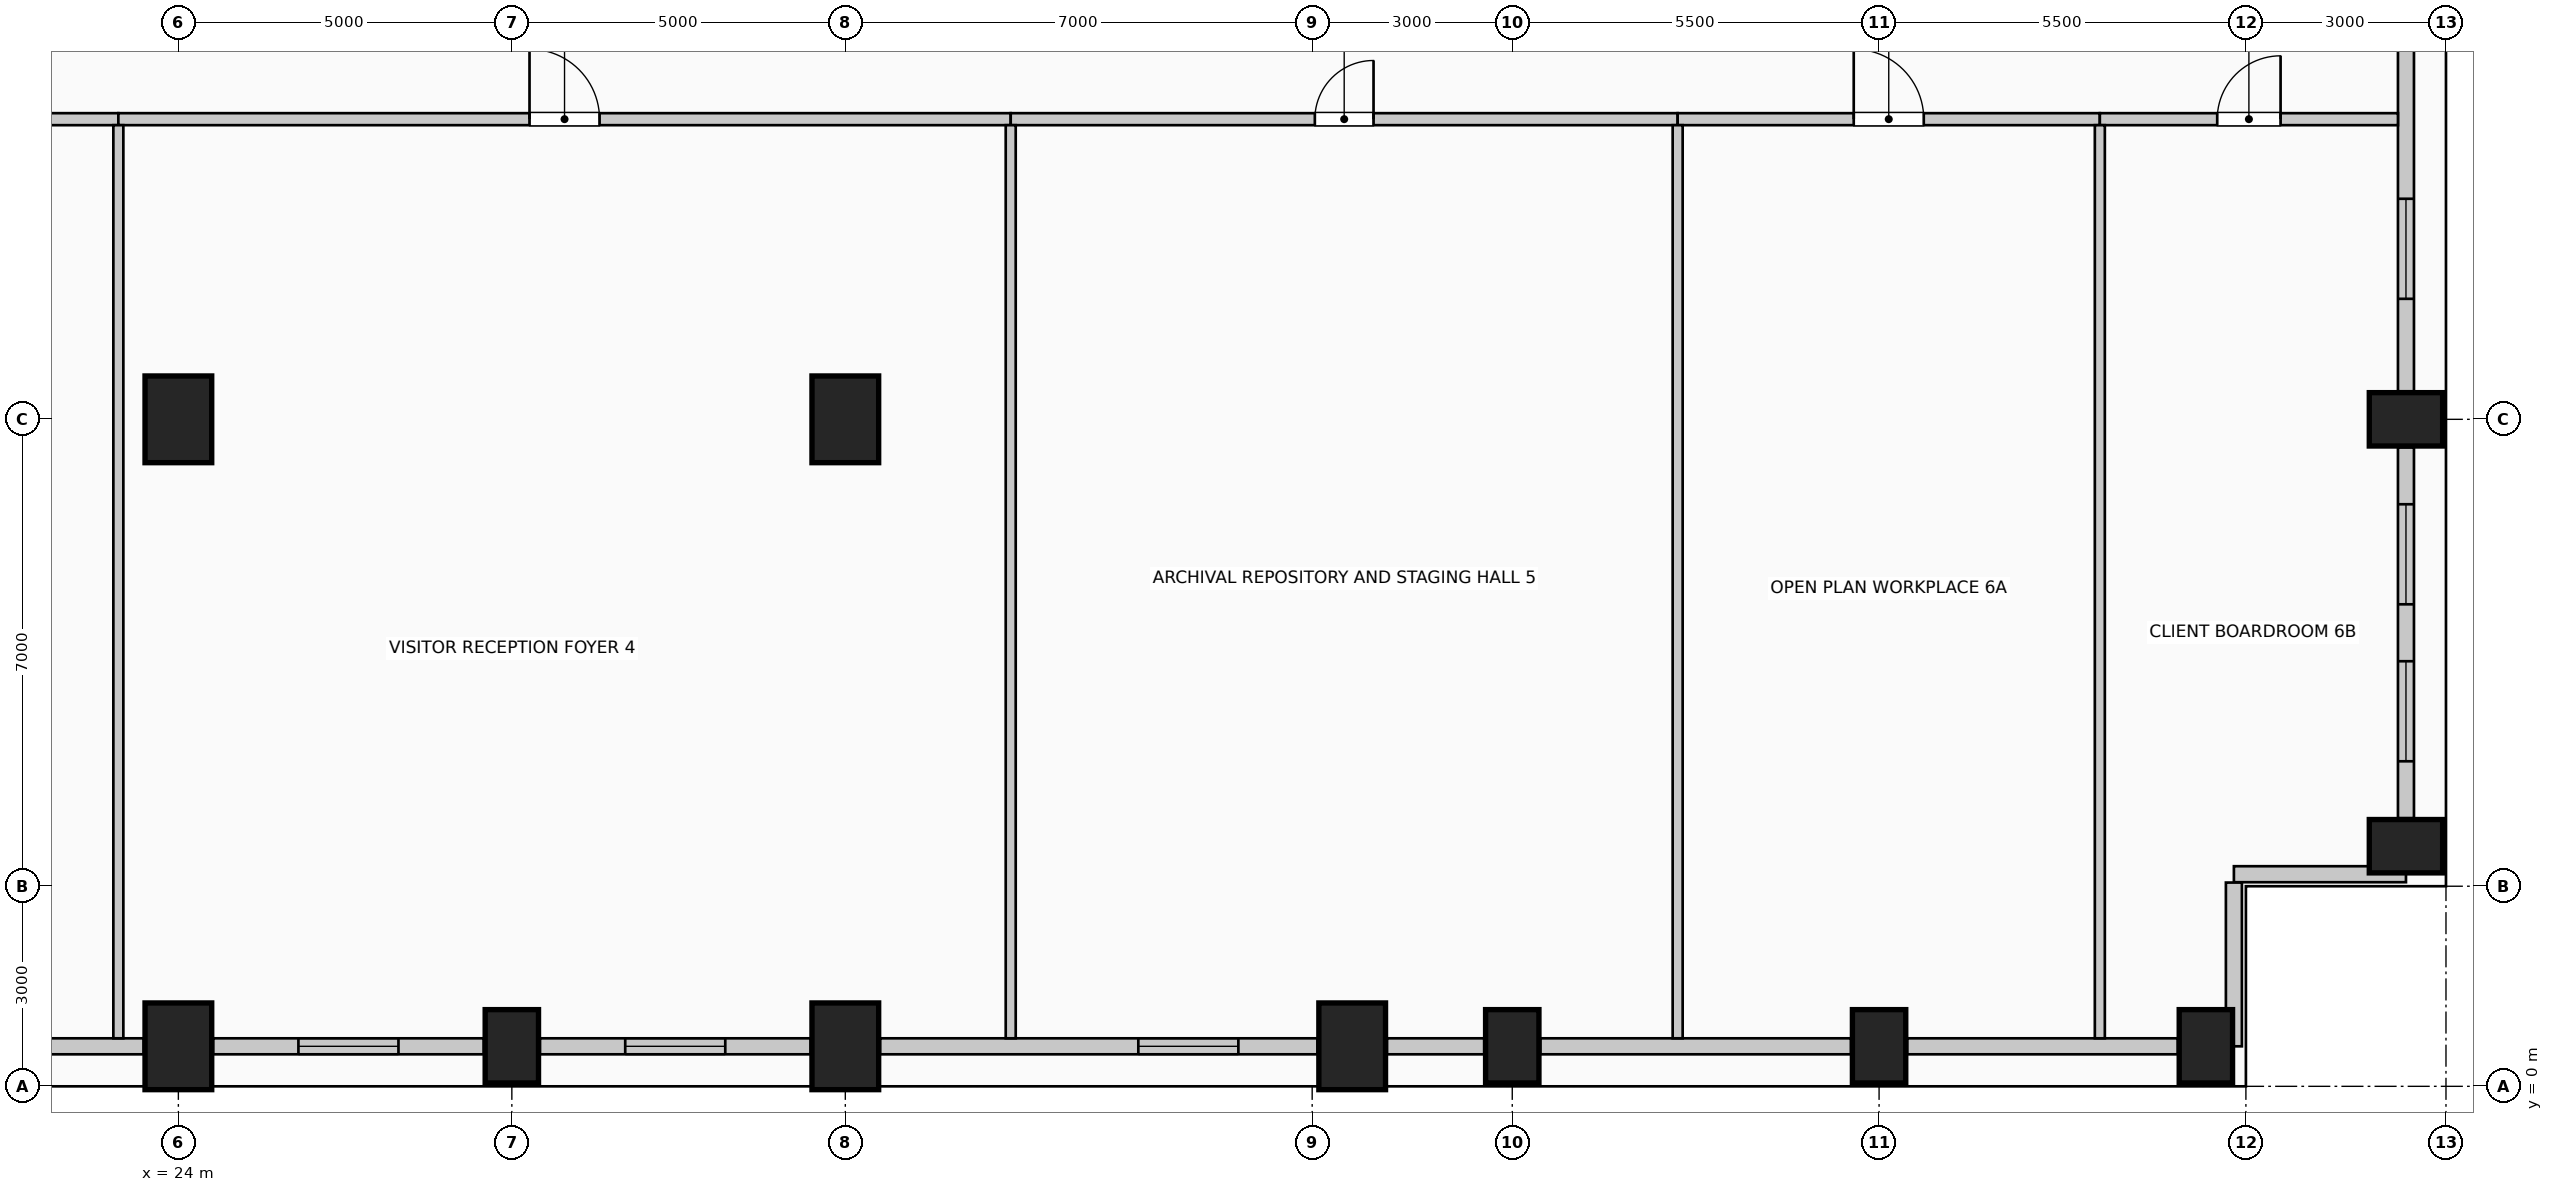
"""IFC4 building model, lengths in metres.
Left out: names, types, materials, properties, quantities, classifications, styles, units other than length and angle.
Written with IfcOpenShell. Run it as: python <this file> out.ifc"""

import sys

from ifc_helpers import new_model, si_unit, direction, frame, frame_2d, origin, origin_2d, place, context, subcontext, project, spatial, rectangle, extrude, element, fill, save


model = new_model("IFC4")
c1 = context("Model", 3, precision=1e-05, world=origin(), true_north=direction((0.0, 1.0)))
c2 = subcontext(c1, "Body", "Model", "MODEL_VIEW")
j1 = project(units=[si_unit("LENGTHUNIT", "METRE"), si_unit("PLANEANGLEUNIT", "RADIAN")], contexts=[c1])
p1 = place(None, origin())
s1 = spatial("IfcSite", under=j1, at=p1, CompositionType="ELEMENT")
p2 = place(p1, origin())
s2 = spatial("IfcBuilding", under=s1, at=p2, CompositionType="ELEMENT")
p3 = place(p2, frame((0.0, 0.0, 210.6)))
s3 = spatial("IfcBuildingStorey", under=s2, at=p3, CompositionType="ELEMENT", Elevation=210.6)
p4 = place(p3, frame((24.0, 0.6, 0.0), z_axis=(0.0, 0.0, 1.0), x_axis=(1.0, 0.0, 0.0)))
e1 = element("IfcColumn", 1, at=p4, inside=s3, PredefinedType="COLUMN", context=c2, shape_type="SweptSolid", body=[
    extrude(rectangle(XDim=1.0, YDim=1.3, at=origin_2d()), origin(), (0.0, 0.0, 1.0), 4.0),
])
p5 = place(p3, frame((29.0, 0.6, 0.0), z_axis=(0.0, 0.0, 1.0), x_axis=(1.0, 0.0, 0.0)))
e2 = element("IfcColumn", 2, at=p5, inside=s3, PredefinedType="COLUMN", context=c2, shape_type="SweptSolid", body=[
    extrude(rectangle(XDim=0.8, YDim=1.1, at=origin_2d()), origin(), (0.0, 0.0, 1.0), 4.0),
])
for number, where, z_axis, x_axis in (
    (3, (34.0, 0.6, 0.0), (0.0, 0.0, 1.0), (1.0, 0.0, 0.0)),
    (4, (41.6, 0.6, 0.0), (0.0, 0.0, 1.0), (1.0, 0.0, 0.0)),
):
    element("IfcColumn", number, at=place(p3, frame(where, z_axis=z_axis, x_axis=x_axis)), inside=s3, PredefinedType="COLUMN", context=c2, shape_type="SweptSolid", body=[
        extrude(rectangle(XDim=1.0, YDim=1.3, at=origin_2d()), origin(), (0.0, 0.0, 1.0), 4.0),
    ])
for number, where, z_axis, x_axis in (
    (5, (44.0, 0.6, 0.0), (0.0, 0.0, 1.0), (1.0, 0.0, 0.0)),
    (6, (49.5, 0.6, 0.0), (0.0, 0.0, 1.0), (1.0, 0.0, 0.0)),
    (7, (54.4, 0.6, 0.0), (0.0, 0.0, 1.0), (1.0, 0.0, 0.0)),
    (8, (57.4, 3.6, 0.0), (0.0, 0.0, 1.0), (0.0, 1.0, 0.0)),
    (9, (57.4, 10.0, 0.0), (0.0, 0.0, 1.0), (0.0, 1.0, 0.0)),
):
    element("IfcColumn", number, at=place(p3, frame(where, z_axis=z_axis, x_axis=x_axis)), inside=s3, PredefinedType="COLUMN", context=c2, shape_type="SweptSolid", body=[
        extrude(rectangle(XDim=0.8, YDim=1.1, at=origin_2d()), origin(), (0.0, 0.0, 1.0), 4.0),
    ])
for number, where, z_axis, x_axis in (
    (10, (24.0, 10.0, 0.0), (0.0, 0.0, 1.0), (1.0, 0.0, 0.0)),
    (11, (34.0, 10.0, 0.0), (0.0, 0.0, 1.0), (1.0, 0.0, 0.0)),
):
    element("IfcColumn", number, at=place(p3, frame(where, z_axis=z_axis, x_axis=x_axis)), inside=s3, PredefinedType="COLUMN", context=c2, shape_type="SweptSolid", body=[
        extrude(rectangle(XDim=1.0, YDim=1.3, at=origin_2d()), origin(), (0.0, 0.0, 1.0), 4.0),
    ])
p6 = place(p3, frame((23.48, 0.6, 0.0), z_axis=(0.0, 0.0, 1.0), x_axis=(-1.0, 0.0, 0.0)))
e12 = element("IfcWall", 12, at=p6, inside=s3, PredefinedType="SOLIDWALL", context=c2, shape_type="SweptSolid", body=[
    extrude(rectangle(XDim=6.56, YDim=0.24, at=frame_2d((3.28, 0.0))), origin(), (0.0, 0.0, 1.0), 3.0),
])
p7 = place(p6, frame((3.873, 0.0, 0.42)))
e13 = element("IfcOpeningElement", 13, at=p7, cuts=e12, PredefinedType="OPENING", context=c2, shape_type="SweptSolid", body=[
    extrude(rectangle(XDim=1.5, YDim=2.2, at=frame_2d((0.75, 1.1))), frame((0.0, 0.13, 0.0), z_axis=(0.0, -1.0, 0.0), x_axis=(1.0, 0.0, 0.0)), (0.0, 0.0, 1.0), 0.26),
])
p8 = place(p3, frame((28.58, 0.6, 0.0), z_axis=(0.0, 0.0, 1.0), x_axis=(-1.0, 0.0, 0.0)))
e14 = element("IfcWall", 14, at=p8, inside=s3, PredefinedType="SOLIDWALL", context=c2, shape_type="SweptSolid", body=[
    extrude(rectangle(XDim=4.06, YDim=0.24, at=frame_2d((2.03, 0.0))), origin(), (0.0, 0.0, 1.0), 3.0),
])
p9 = place(p8, frame((1.28, 0.0, 0.42)))
e15 = element("IfcOpeningElement", 15, at=p9, cuts=e14, PredefinedType="OPENING", context=c2, shape_type="SweptSolid", body=[
    extrude(rectangle(XDim=1.5, YDim=2.2, at=frame_2d((0.75, 1.1))), frame((0.0, 0.13, 0.0), z_axis=(0.0, -1.0, 0.0), x_axis=(1.0, 0.0, 0.0)), (0.0, 0.0, 1.0), 0.26),
])
p10 = place(p3, frame((33.48, 0.6, 0.0), z_axis=(0.0, 0.0, 1.0), x_axis=(-1.0, 0.0, 0.0)))
e16 = element("IfcWall", 16, at=p10, inside=s3, PredefinedType="SOLIDWALL", context=c2, shape_type="SweptSolid", body=[
    extrude(rectangle(XDim=4.06, YDim=0.24, at=frame_2d((2.03, 0.0))), origin(), (0.0, 0.0, 1.0), 3.0),
])
p11 = place(p10, frame((1.28, 0.0, 0.42)))
e17 = element("IfcOpeningElement", 17, at=p11, cuts=e16, PredefinedType="OPENING", context=c2, shape_type="SweptSolid", body=[
    extrude(rectangle(XDim=1.5, YDim=2.2, at=frame_2d((0.75, 1.1))), frame((0.0, 0.13, 0.0), z_axis=(0.0, -1.0, 0.0), x_axis=(1.0, 0.0, 0.0)), (0.0, 0.0, 1.0), 0.26),
])
p12 = place(p3, frame((41.08, 0.6, 0.0), z_axis=(0.0, 0.0, 1.0), x_axis=(-1.0, 0.0, 0.0)))
e18 = element("IfcWall", 18, at=p12, inside=s3, PredefinedType="SOLIDWALL", context=c2, shape_type="SweptSolid", body=[
    extrude(rectangle(XDim=6.56, YDim=0.24, at=frame_2d((3.28, 0.0))), origin(), (0.0, 0.0, 1.0), 3.0),
])
p13 = place(p12, frame((1.187, 0.0, 0.42)))
e19 = element("IfcOpeningElement", 19, at=p13, cuts=e18, PredefinedType="OPENING", context=c2, shape_type="SweptSolid", body=[
    extrude(rectangle(XDim=1.5, YDim=2.2, at=frame_2d((0.75, 1.1))), frame((0.0, 0.13, 0.0), z_axis=(0.0, -1.0, 0.0), x_axis=(1.0, 0.0, 0.0)), (0.0, 0.0, 1.0), 0.26),
])
p14 = place(p3, frame((43.58, 0.6, 0.0), z_axis=(0.0, 0.0, 1.0), x_axis=(-1.0, 0.0, 0.0)))
e20 = element("IfcWall", 20, at=p14, inside=s3, PredefinedType="SOLIDWALL", context=c2, shape_type="SweptSolid", body=[
    extrude(rectangle(XDim=1.46, YDim=0.24, at=frame_2d((0.73, 0.0))), origin(), (0.0, 0.0, 1.0), 3.0),
])
p15 = place(p3, frame((49.08, 0.6, 0.0), z_axis=(0.0, 0.0, 1.0), x_axis=(-1.0, 0.0, 0.0)))
e21 = element("IfcWall", 21, at=p15, inside=s3, PredefinedType="SOLIDWALL", context=c2, shape_type="SweptSolid", body=[
    extrude(rectangle(XDim=4.66, YDim=0.24, at=frame_2d((2.33, 0.0))), origin(), (0.0, 0.0, 1.0), 3.0),
])
p16 = place(p3, frame((53.98, 0.6, 0.0), z_axis=(0.0, 0.0, 1.0), x_axis=(-1.0, 0.0, 0.0)))
e22 = element("IfcWall", 22, at=p16, inside=s3, PredefinedType="SOLIDWALL", context=c2, shape_type="SweptSolid", body=[
    extrude(rectangle(XDim=4.06, YDim=0.24, at=frame_2d((2.03, 0.0))), origin(), (0.0, 0.0, 1.0), 3.0),
])
p17 = place(p3, frame((57.4, 9.58, 0.0), z_axis=(0.0, 0.0, 1.0), x_axis=(0.0, -1.0, 0.0)))
e23 = element("IfcWall", 23, at=p17, inside=s3, PredefinedType="SOLIDWALL", context=c2, shape_type="SweptSolid", body=[
    extrude(rectangle(XDim=5.56, YDim=0.24, at=frame_2d((2.78, 0.0))), origin(), (0.0, 0.0, 1.0), 3.0),
])
p18 = place(p17, frame((0.853, 0.0, 0.42)))
e24 = element("IfcOpeningElement", 24, at=p18, cuts=e23, PredefinedType="OPENING", context=c2, shape_type="SweptSolid", body=[
    extrude(rectangle(XDim=1.5, YDim=2.2, at=frame_2d((0.75, 1.1))), frame((0.0, 0.13, 0.0), z_axis=(0.0, -1.0, 0.0), x_axis=(1.0, 0.0, 0.0)), (0.0, 0.0, 1.0), 0.26),
])
p19 = place(p17, frame((3.207, 0.0, 0.42)))
e25 = element("IfcOpeningElement", 25, at=p19, cuts=e23, PredefinedType="OPENING", context=c2, shape_type="SweptSolid", body=[
    extrude(rectangle(XDim=1.5, YDim=2.2, at=frame_2d((0.75, 1.1))), frame((0.0, 0.13, 0.0), z_axis=(0.0, -1.0, 0.0), x_axis=(1.0, 0.0, 0.0)), (0.0, 0.0, 1.0), 0.26),
])
p20 = place(p3, frame((57.4, 17.58, 0.0), z_axis=(0.0, 0.0, 1.0), x_axis=(0.0, -1.0, 0.0)))
e26 = element("IfcWall", 26, at=p20, inside=s3, PredefinedType="SOLIDWALL", context=c2, shape_type="SweptSolid", body=[
    extrude(rectangle(XDim=7.16, YDim=0.24, at=frame_2d((3.58, 0.0))), origin(), (0.0, 0.0, 1.0), 3.0),
])
p21 = place(p20, frame((4.273, 0.0, 0.42)))
e27 = element("IfcOpeningElement", 27, at=p21, cuts=e26, PredefinedType="OPENING", context=c2, shape_type="SweptSolid", body=[
    extrude(rectangle(XDim=1.5, YDim=2.2, at=frame_2d((0.75, 1.1))), frame((0.0, 0.13, 0.0), z_axis=(0.0, -1.0, 0.0), x_axis=(1.0, 0.0, 0.0)), (0.0, 0.0, 1.0), 0.26),
])
p22 = place(p3, frame((57.4, 3.18, 0.0), z_axis=(0.0, 0.0, 1.0), x_axis=(-1.0, 0.0, 0.0)))
e28 = element("IfcWall", 28, at=p22, inside=s3, PredefinedType="SOLIDWALL", context=c2, shape_type="SweptSolid", body=[
    extrude(rectangle(XDim=2.58, YDim=0.24, at=frame_2d((1.29, 0.0))), origin(), (0.0, 0.0, 1.0), 3.75),
])
p23 = place(p3, frame((54.82, 3.055, 0.0), z_axis=(0.0, 0.0, 1.0), x_axis=(0.0, -1.0, 0.0)))
e29 = element("IfcWall", 29, at=p23, inside=s3, PredefinedType="SOLIDWALL", context=c2, shape_type="SweptSolid", body=[
    extrude(rectangle(XDim=2.455, YDim=0.24, at=frame_2d((1.228, 0.0))), origin(), (0.0, 0.0, 1.0), 3.75),
])
p24 = place(p3, frame((16.4, 14.5, 0.0), z_axis=(0.0, 0.0, 1.0), x_axis=(1.0, 0.0, 0.0)))
e30 = element("IfcWall", 30, at=p24, inside=s3, PredefinedType="PARTITIONING", context=c2, shape_type="SweptSolid", body=[
    extrude(rectangle(XDim=6.7, YDim=0.18, at=frame_2d((3.35, 0.0))), origin(), (0.0, 0.0, 1.0), 3.75),
])
p25 = place(p24, frame((2.875, 0.0, 0.0)))
e31 = element("IfcOpeningElement", 31, at=p25, cuts=e30, PredefinedType="OPENING", context=c2, shape_type="SweptSolid", body=[
    extrude(rectangle(XDim=0.95, YDim=2.15, at=frame_2d((0.475, 1.075))), frame((0.0, 0.1, 0.0), z_axis=(0.0, -1.0, 0.0), x_axis=(1.0, 0.0, 0.0)), (0.0, 0.0, 1.0), 0.2),
])
p26 = place(p3, frame((23.1, 14.5, 0.0), z_axis=(0.0, 0.0, 1.0), x_axis=(1.0, 0.0, 0.0)))
e32 = element("IfcWall", 32, at=p26, inside=s3, PredefinedType="PARTITIONING", context=c2, shape_type="SweptSolid", body=[
    extrude(rectangle(XDim=13.38, YDim=0.18, at=frame_2d((6.69, 0.0))), origin(), (0.0, 0.0, 1.0), 3.75),
])
p27 = place(p26, frame((6.165, 0.0, 0.0)))
e33 = element("IfcOpeningElement", 33, at=p27, cuts=e32, PredefinedType="OPENING", context=c2, shape_type="SweptSolid", body=[
    extrude(rectangle(XDim=1.05, YDim=2.15, at=frame_2d((0.525, 1.075))), frame((0.0, 0.1, 0.0), z_axis=(0.0, -1.0, 0.0), x_axis=(1.0, 0.0, 0.0)), (0.0, 0.0, 1.0), 0.2),
])
p28 = place(p3, frame((36.48, 14.5, 0.0), z_axis=(0.0, 0.0, 1.0), x_axis=(1.0, 0.0, 0.0)))
e34 = element("IfcWall", 34, at=p28, inside=s3, PredefinedType="PARTITIONING", context=c2, shape_type="SweptSolid", body=[
    extrude(rectangle(XDim=10.0, YDim=0.18, at=frame_2d((5.0, 0.0))), origin(), (0.0, 0.0, 1.0), 3.75),
])
p29 = place(p28, frame((4.56, 0.0, 0.0)))
e35 = element("IfcOpeningElement", 35, at=p29, cuts=e34, PredefinedType="OPENING", context=c2, shape_type="SweptSolid", body=[
    extrude(rectangle(XDim=0.88, YDim=2.1, at=frame_2d((0.44, 1.05))), frame((0.0, 0.1, 0.0), z_axis=(0.0, -1.0, 0.0), x_axis=(1.0, 0.0, 0.0)), (0.0, 0.0, 1.0), 0.2),
])
p30 = place(p3, frame((46.48, 14.5, 0.0), z_axis=(0.0, 0.0, 1.0), x_axis=(1.0, 0.0, 0.0)))
e36 = element("IfcWall", 36, at=p30, inside=s3, PredefinedType="PARTITIONING", context=c2, shape_type="SweptSolid", body=[
    extrude(rectangle(XDim=6.33, YDim=0.18, at=frame_2d((3.165, 0.0))), origin(), (0.0, 0.0, 1.0), 3.75),
])
p31 = place(p30, frame((2.64, 0.0, 0.0)))
e37 = element("IfcOpeningElement", 37, at=p31, cuts=e36, PredefinedType="OPENING", context=c2, shape_type="SweptSolid", body=[
    extrude(rectangle(XDim=1.05, YDim=2.15, at=frame_2d((0.525, 1.075))), frame((0.0, 0.1, 0.0), z_axis=(0.0, -1.0, 0.0), x_axis=(1.0, 0.0, 0.0)), (0.0, 0.0, 1.0), 0.2),
])
p32 = place(p3, frame((52.81, 14.5, 0.0), z_axis=(0.0, 0.0, 1.0), x_axis=(1.0, 0.0, 0.0)))
e38 = element("IfcWall", 38, at=p32, inside=s3, PredefinedType="PARTITIONING", context=c2, shape_type="SweptSolid", body=[
    extrude(rectangle(XDim=4.47, YDim=0.18, at=frame_2d((2.235, 0.0))), origin(), (0.0, 0.0, 1.0), 3.75),
])
p33 = place(p32, frame((1.76, 0.0, 0.0)))
e39 = element("IfcOpeningElement", 39, at=p33, cuts=e38, PredefinedType="OPENING", context=c2, shape_type="SweptSolid", body=[
    extrude(rectangle(XDim=0.95, YDim=2.15, at=frame_2d((0.475, 1.075))), frame((0.0, 0.1, 0.0), z_axis=(0.0, -1.0, 0.0), x_axis=(1.0, 0.0, 0.0)), (0.0, 0.0, 1.0), 0.2),
])
for number, where, z_axis, x_axis in (
    (40, (23.1, 0.72, 0.0), (0.0, 0.0, 1.0), (0.0, 1.0, 0.0)),
    (41, (36.48, 0.72, 0.0), (0.0, 0.0, 1.0), (0.0, 1.0, 0.0)),
    (42, (46.48, 0.72, 0.0), (0.0, 0.0, 1.0), (0.0, 1.0, 0.0)),
    (43, (52.81, 0.72, 0.0), (0.0, 0.0, 1.0), (0.0, 1.0, 0.0)),
):
    element("IfcWall", number, at=place(p3, frame(where, z_axis=z_axis, x_axis=x_axis)), inside=s3, PredefinedType="PARTITIONING", context=c2, shape_type="SweptSolid", body=[
        extrude(rectangle(XDim=13.69, YDim=0.15, at=frame_2d((6.845, 0.0))), origin(), (0.0, 0.0, 1.0), 3.75),
    ])
p34 = place(p9, origin())
e44 = element("IfcWindow", 44, at=p34, inside=s3, PartitioningType="SINGLE_PANEL", PredefinedType="WINDOW", context=c2, shape_type="SweptSolid", body=[
    extrude(rectangle(XDim=1.5, YDim=2.2, at=frame_2d((0.75, 1.1))), frame((0.0, 0.03, 0.0), z_axis=(0.0, -1.0, 0.0), x_axis=(1.0, 0.0, 0.0)), (0.0, 0.0, 1.0), 0.06),
])
fill(e15, e44)
p35 = place(p11, origin())
e45 = element("IfcWindow", 45, at=p35, inside=s3, PartitioningType="SINGLE_PANEL", PredefinedType="WINDOW", context=c2, shape_type="SweptSolid", body=[
    extrude(rectangle(XDim=1.5, YDim=2.2, at=frame_2d((0.75, 1.1))), frame((0.0, 0.03, 0.0), z_axis=(0.0, -1.0, 0.0), x_axis=(1.0, 0.0, 0.0)), (0.0, 0.0, 1.0), 0.06),
])
fill(e17, e45)
p36 = place(p13, origin())
e46 = element("IfcWindow", 46, at=p36, inside=s3, PartitioningType="SINGLE_PANEL", PredefinedType="WINDOW", context=c2, shape_type="SweptSolid", body=[
    extrude(rectangle(XDim=1.5, YDim=2.2, at=frame_2d((0.75, 1.1))), frame((0.0, 0.03, 0.0), z_axis=(0.0, -1.0, 0.0), x_axis=(1.0, 0.0, 0.0)), (0.0, 0.0, 1.0), 0.06),
])
fill(e19, e46)
p37 = place(p18, origin())
e47 = element("IfcWindow", 47, at=p37, inside=s3, PartitioningType="SINGLE_PANEL", PredefinedType="WINDOW", context=c2, shape_type="SweptSolid", body=[
    extrude(rectangle(XDim=1.5, YDim=2.2, at=frame_2d((0.75, 1.1))), frame((0.0, 0.03, 0.0), z_axis=(0.0, -1.0, 0.0), x_axis=(1.0, 0.0, 0.0)), (0.0, 0.0, 1.0), 0.06),
])
fill(e24, e47)
p38 = place(p19, origin())
e48 = element("IfcWindow", 48, at=p38, inside=s3, PartitioningType="SINGLE_PANEL", PredefinedType="WINDOW", context=c2, shape_type="SweptSolid", body=[
    extrude(rectangle(XDim=1.5, YDim=2.2, at=frame_2d((0.75, 1.1))), frame((0.0, 0.03, 0.0), z_axis=(0.0, -1.0, 0.0), x_axis=(1.0, 0.0, 0.0)), (0.0, 0.0, 1.0), 0.06),
])
fill(e25, e48)
p39 = place(p21, origin())
e49 = element("IfcWindow", 49, at=p39, inside=s3, PartitioningType="SINGLE_PANEL", PredefinedType="WINDOW", context=c2, shape_type="SweptSolid", body=[
    extrude(rectangle(XDim=1.5, YDim=2.2, at=frame_2d((0.75, 1.1))), frame((0.0, 0.03, 0.0), z_axis=(0.0, -1.0, 0.0), x_axis=(1.0, 0.0, 0.0)), (0.0, 0.0, 1.0), 0.06),
])
fill(e27, e49)
p40 = place(p27, origin())
e50 = element("IfcDoor", 50, at=p40, inside=s3, OperationType="SINGLE_SWING_LEFT", PredefinedType="DOOR", context=c2, shape_type="SweptSolid", body=[
    extrude(rectangle(XDim=1.05, YDim=2.15, at=frame_2d((0.525, 1.075))), frame((0.0, 0.025, 0.0), z_axis=(0.0, -1.0, 0.0), x_axis=(1.0, 0.0, 0.0)), (0.0, 0.0, 1.0), 0.05),
])
fill(e33, e50)
p41 = place(p29, origin())
e51 = element("IfcDoor", 51, at=p41, inside=s3, OperationType="SINGLE_SWING_RIGHT", PredefinedType="DOOR", context=c2, shape_type="SweptSolid", body=[
    extrude(rectangle(XDim=0.88, YDim=2.1, at=frame_2d((0.44, 1.05))), frame((0.0, 0.025, 0.0), z_axis=(0.0, -1.0, 0.0), x_axis=(1.0, 0.0, 0.0)), (0.0, 0.0, 1.0), 0.05),
])
fill(e35, e51)
p42 = place(p31, origin())
e52 = element("IfcDoor", 52, at=p42, inside=s3, OperationType="SINGLE_SWING_LEFT", PredefinedType="DOOR", context=c2, shape_type="SweptSolid", body=[
    extrude(rectangle(XDim=1.05, YDim=2.15, at=frame_2d((0.525, 1.075))), frame((0.0, 0.025, 0.0), z_axis=(0.0, -1.0, 0.0), x_axis=(1.0, 0.0, 0.0)), (0.0, 0.0, 1.0), 0.05),
])
fill(e37, e52)
p43 = place(p33, origin())
e53 = element("IfcDoor", 53, at=p43, inside=s3, OperationType="SINGLE_SWING_RIGHT", PredefinedType="DOOR", context=c2, shape_type="SweptSolid", body=[
    extrude(rectangle(XDim=0.95, YDim=2.15, at=frame_2d((0.475, 1.075))), frame((0.0, 0.025, 0.0), z_axis=(0.0, -1.0, 0.0), x_axis=(1.0, 0.0, 0.0)), (0.0, 0.0, 1.0), 0.05),
])
fill(e39, e53)
save(model, sys.argv[1])
